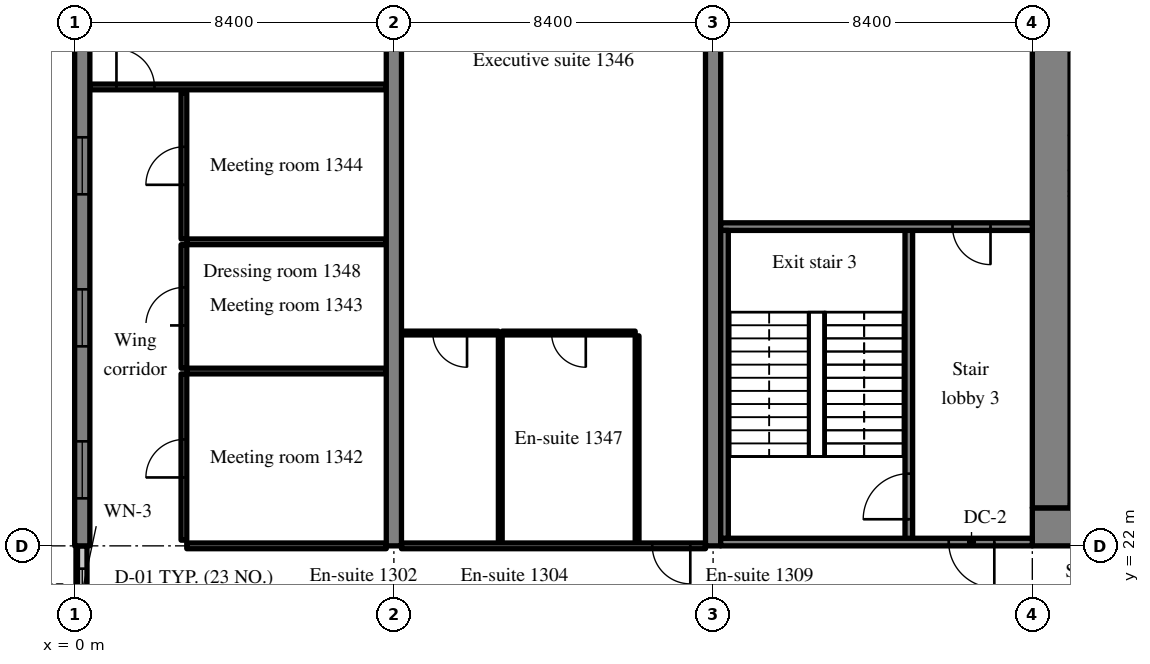
"""IFC4 building model, lengths in metres.
Left out: names, types, materials, properties, quantities, classifications, styles, units other than length and angle.
Written with IfcOpenShell. Run it as: python <this file> out.ifc"""

import sys

from ifc_helpers import new_model, si_unit, direction, frame, frame_2d, origin, place, context, subcontext, project, spatial, rectangle, extrude, source, transform, mapped, element, fill, save


model = new_model("IFC4")
c1 = context("Model", 3, precision=1e-05, world=origin(), true_north=direction((0.0, 1.0)))
c2 = subcontext(c1, "Body", "Model", "MODEL_VIEW")
j1 = project(units=[si_unit("LENGTHUNIT", "METRE"), si_unit("PLANEANGLEUNIT", "RADIAN")], contexts=[c1])
p1 = place(None, origin())
s1 = spatial("IfcSite", under=j1, at=p1, CompositionType="ELEMENT")
p2 = place(p1, origin())
s2 = spatial("IfcBuilding", under=s1, at=p2, CompositionType="ELEMENT")
p3 = place(p2, frame((0.0, 0.0, 58.2)))
s3 = spatial("IfcBuildingStorey", under=s2, at=p3, CompositionType="ELEMENT", Elevation=58.2)
m1 = source(origin(), c2, "Body", "SweptSolid", [
    extrude(rectangle(XDim=50.4, YDim=1.0, at=frame_2d((25.2, 0.0))), origin(), (0.0, 0.0, 1.0), 3.52),
])
p4 = place(p3, frame((25.2, 22.5, 0.0), z_axis=(0.0, 0.0, 1.0), x_axis=(1.0, 0.0, 0.0)))
e1 = element("IfcWall", 1, at=p4, inside=s3, PredefinedType="SHEAR", context=c2, shape_type="MappedRepresentation", body=[
    mapped(m1, transform((0.0, 0.0, 0.0), scale=1.0)),
])
m2 = source(origin(), c2, "Body", "SweptSolid", [
    extrude(rectangle(XDim=1.8, YDim=2.1, at=frame_2d((0.9, 1.05))), frame((0.0, 0.51, 0.0), z_axis=(0.0, -1.0, 0.0), x_axis=(1.0, 0.0, 0.0)), (0.0, 0.0, 1.0), 1.02),
])
p5 = place(p4, frame((15.9, 0.0, 0.0)))
e2 = element("IfcOpeningElement", 2, at=p5, cuts=e1, PredefinedType="OPENING", context=c2, shape_type="MappedRepresentation", body=[
    mapped(m2, transform((0.0, 0.0, 0.0), scale=1.0)),
])
m3 = source(origin(), c2, "Body", "SweptSolid", [
    extrude(rectangle(XDim=1.2, YDim=2.1, at=frame_2d((0.6, 1.05))), frame((0.0, 0.51, 0.0), z_axis=(0.0, -1.0, 0.0), x_axis=(1.0, 0.0, 0.0)), (0.0, 0.0, 1.0), 1.02),
])
p6 = place(p4, frame((26.987, 0.0, 0.0)))
e3 = element("IfcOpeningElement", 3, at=p6, cuts=e1, PredefinedType="OPENING", context=c2, shape_type="MappedRepresentation", body=[
    mapped(m3, transform((0.0, 0.0, 0.0), scale=1.0)),
])
m4 = source(origin(), c2, "Body", "SweptSolid", [
    extrude(rectangle(XDim=0.9, YDim=2.1, at=frame_2d((0.45, 1.05))), frame((0.0, 0.51, 0.0), z_axis=(0.0, -1.0, 0.0), x_axis=(1.0, 0.0, 0.0)), (0.0, 0.0, 1.0), 1.02),
])
p7 = place(p4, frame((34.5, 0.0, 0.0)))
e4 = element("IfcOpeningElement", 4, at=p7, cuts=e1, PredefinedType="OPENING", context=c2, shape_type="MappedRepresentation", body=[
    mapped(m4, transform((0.0, 0.0, 0.0), scale=1.0)),
])
p8 = place(p4, frame((31.5, 0.0, 0.0)))
e5 = element("IfcOpeningElement", 5, at=p8, cuts=e1, PredefinedType="OPENING", context=c2, shape_type="MappedRepresentation", body=[
    mapped(m4, transform((0.0, 0.0, 0.0), scale=1.0)),
])
p9 = place(p4, frame((39.769, 0.0, 0.0)))
e6 = element("IfcOpeningElement", 6, at=p9, cuts=e1, PredefinedType="OPENING", context=c2, shape_type="MappedRepresentation", body=[
    mapped(m4, transform((0.0, 0.0, 0.0), scale=1.0)),
])
p10 = place(p4, frame((36.756, 0.0, 0.0)))
e7 = element("IfcOpeningElement", 7, at=p10, cuts=e1, PredefinedType="OPENING", context=c2, shape_type="MappedRepresentation", body=[
    mapped(m4, transform((0.0, 0.0, 0.0), scale=1.0)),
])
p11 = place(p4, frame((6.438, 0.0, 0.0)))
e8 = element("IfcOpeningElement", 8, at=p11, cuts=e1, PredefinedType="OPENING", context=c2, shape_type="MappedRepresentation", body=[
    mapped(m3, transform((0.0, 0.0, 0.0), scale=1.0)),
])
p12 = place(p4, frame((47.725, 0.0, 0.0)))
e9 = element("IfcOpeningElement", 9, at=p12, cuts=e1, PredefinedType="OPENING", context=c2, shape_type="MappedRepresentation", body=[
    mapped(m3, transform((0.0, 0.0, 0.0), scale=1.0)),
])
m5 = source(origin(), c2, "Body", "SweptSolid", [
    extrude(rectangle(XDim=18.0, YDim=1.0, at=frame_2d((9.0, 0.0))), origin(), (0.0, 0.0, 1.0), 3.52),
])
p13 = place(p3, frame((25.7, 23.0, 0.0), z_axis=(0.0, 0.0, 1.0), x_axis=(0.0, 1.0, 0.0)))
e10 = element("IfcWall", 10, at=p13, inside=s3, PredefinedType="SHEAR", context=c2, shape_type="MappedRepresentation", body=[
    mapped(m5, transform((0.0, 0.0, 0.0), scale=1.0)),
])
m6 = source(origin(), c2, "Body", "SweptSolid", [
    extrude(rectangle(XDim=16.0, YDim=0.4, at=frame_2d((8.0, 0.0))), origin(), (0.0, 0.0, 1.0), 3.52),
])
p14 = place(p3, frame((0.2, 22.0, 0.0), z_axis=(0.0, 0.0, 1.0), x_axis=(0.0, 1.0, 0.0)))
e11 = element("IfcWall", 11, at=p14, inside=s3, PredefinedType="SHEAR", context=c2, shape_type="MappedRepresentation", body=[
    mapped(m6, transform((0.0, 0.0, 0.0), scale=1.0)),
])
m7 = source(origin(), c2, "Body", "SweptSolid", [
    extrude(rectangle(XDim=1.5, YDim=1.5, at=frame_2d((0.75, 0.75))), frame((0.0, 0.21, 0.0), z_axis=(0.0, -1.0, 0.0), x_axis=(1.0, 0.0, 0.0)), (0.0, 0.0, 1.0), 0.42),
])
p15 = place(p14, frame((1.25, 0.0, 0.9)))
e12 = element("IfcOpeningElement", 12, at=p15, cuts=e11, PredefinedType="OPENING", context=c2, shape_type="MappedRepresentation", body=[
    mapped(m7, transform((0.0, 0.0, 0.0), scale=1.0)),
])
p16 = place(p14, frame((5.25, 0.0, 0.9)))
e13 = element("IfcOpeningElement", 13, at=p16, cuts=e11, PredefinedType="OPENING", context=c2, shape_type="MappedRepresentation", body=[
    mapped(m7, transform((0.0, 0.0, 0.0), scale=1.0)),
])
p17 = place(p14, frame((9.25, 0.0, 0.9)))
e14 = element("IfcOpeningElement", 14, at=p17, cuts=e11, PredefinedType="OPENING", context=c2, shape_type="MappedRepresentation", body=[
    mapped(m7, transform((0.0, 0.0, 0.0), scale=1.0)),
])
p18 = place(p14, frame((13.25, 0.0, 0.9)))
e15 = element("IfcOpeningElement", 15, at=p18, cuts=e11, PredefinedType="OPENING", context=c2, shape_type="MappedRepresentation", body=[
    mapped(m7, transform((0.0, 0.0, 0.0), scale=1.0)),
])
m8 = source(origin(), c2, "Body", "SweptSolid", [
    extrude(rectangle(XDim=20.0, YDim=0.4, at=frame_2d((10.0, 0.0))), origin(), (0.0, 0.0, 1.0), 3.52),
])
for number, where, z_axis, x_axis in (
    (16, (8.4, 22.0, 0.0), (0.0, 0.0, 1.0), (0.0, 1.0, 0.0)),
    (17, (16.8, 22.0, 0.0), (0.0, 0.0, 1.0), (0.0, 1.0, 0.0)),
):
    element("IfcWall", number, at=place(p3, frame(where, z_axis=z_axis, x_axis=x_axis)), inside=s3, PredefinedType="SHEAR", context=c2, shape_type="MappedRepresentation", body=[
        mapped(m8, transform((0.0, 0.0, 0.0), scale=1.0)),
    ])
m9 = source(origin(), c2, "Body", "SweptSolid", [
    extrude(rectangle(XDim=2.4, YDim=0.25, at=frame_2d((1.2, 0.0))), origin(), (0.0, 0.0, 1.0), 2.62),
])
p19 = place(p3, frame((0.2, 19.6, 0.0), z_axis=(0.0, 0.0, 1.0), x_axis=(0.0, 1.0, 0.0)))
e18 = element("IfcWall", 18, at=p19, inside=s3, PredefinedType="SOLIDWALL", context=c2, shape_type="MappedRepresentation", body=[
    mapped(m9, transform((0.0, 0.0, 0.0), scale=1.0)),
])
m10 = source(origin(), c2, "Body", "SweptSolid", [
    extrude(rectangle(XDim=1.2, YDim=1.5, at=frame_2d((0.6, 0.75))), frame((0.0, 0.135, 0.0), z_axis=(0.0, -1.0, 0.0), x_axis=(1.0, 0.0, 0.0)), (0.0, 0.0, 1.0), 0.27),
])
p20 = place(p19, frame((0.6, 0.0, 0.9)))
e19 = element("IfcOpeningElement", 19, at=p20, cuts=e18, PredefinedType="OPENING", context=c2, shape_type="MappedRepresentation", body=[
    mapped(m10, transform((0.0, 0.0, 0.0), scale=1.0)),
])
m11 = source(origin(), c2, "Body", "SweptSolid", [
    extrude(rectangle(XDim=8.3, YDim=0.2, at=frame_2d((4.15, 0.0))), origin(), (0.0, 0.0, 1.0), 3.52),
])
p21 = place(p3, frame((21.95, 22.1, 0.0), z_axis=(0.0, 0.0, 1.0), x_axis=(0.0, 1.0, 0.0)))
e20 = element("IfcWall", 20, at=p21, inside=s3, PredefinedType="SOLIDWALL", context=c2, shape_type="MappedRepresentation", body=[
    mapped(m11, transform((0.0, 0.0, 0.0), scale=1.0)),
])
m12 = source(origin(), c2, "Body", "SweptSolid", [
    extrude(rectangle(XDim=1.2, YDim=2.1, at=frame_2d((0.6, 1.05))), frame((0.0, 0.11, 0.0), z_axis=(0.0, -1.0, 0.0), x_axis=(1.0, 0.0, 0.0)), (0.0, 0.0, 1.0), 0.22),
])
p22 = place(p21, frame((0.6, 0.0, 0.0)))
e21 = element("IfcOpeningElement", 21, at=p22, cuts=e20, PredefinedType="OPENING", context=c2, shape_type="MappedRepresentation", body=[
    mapped(m12, transform((0.0, 0.0, 0.0), scale=1.0)),
])
m13 = source(origin(), c2, "Body", "SweptSolid", [
    extrude(rectangle(XDim=8.2, YDim=0.2, at=frame_2d((4.1, 0.0))), origin(), (0.0, 0.0, 1.0), 3.52),
])
p23 = place(p3, frame((17.0, 22.1, 0.0), z_axis=(0.0, 0.0, 1.0), x_axis=(1.0, 0.0, 0.0)))
e22 = element("IfcWall", 22, at=p23, inside=s3, PredefinedType="SOLIDWALL", context=c2, shape_type="MappedRepresentation", body=[
    mapped(m13, transform((0.0, 0.0, 0.0), scale=1.0)),
])
p24 = place(p23, frame((6.0, 0.0, 0.0)))
e23 = element("IfcOpeningElement", 23, at=p24, cuts=e22, PredefinedType="OPENING", context=c2, shape_type="MappedRepresentation", body=[
    mapped(m12, transform((0.0, 0.0, 0.0), scale=1.0)),
])
p25 = place(p3, frame((17.0, 30.4, 0.0), z_axis=(0.0, 0.0, 1.0), x_axis=(1.0, 0.0, 0.0)))
e24 = element("IfcWall", 24, at=p25, inside=s3, PredefinedType="SOLIDWALL", context=c2, shape_type="MappedRepresentation", body=[
    mapped(m13, transform((0.0, 0.0, 0.0), scale=1.0)),
])
m14 = source(origin(), c2, "Body", "SweptSolid", [
    extrude(rectangle(XDim=1.0, YDim=2.1, at=frame_2d((0.5, 1.05))), frame((0.0, 0.11, 0.0), z_axis=(0.0, -1.0, 0.0), x_axis=(1.0, 0.0, 0.0)), (0.0, 0.0, 1.0), 0.22),
])
p26 = place(p25, frame((6.1, 0.0, 0.0)))
e25 = element("IfcOpeningElement", 25, at=p26, cuts=e24, PredefinedType="OPENING", context=c2, shape_type="MappedRepresentation", body=[
    mapped(m14, transform((0.0, 0.0, 0.0), scale=1.0)),
])
m15 = source(origin(), c2, "Body", "SweptSolid", [
    extrude(rectangle(XDim=8.1, YDim=0.2, at=frame_2d((4.05, 0.0))), origin(), (0.0, 0.0, 1.0), 3.52),
])
p27 = place(p3, frame((17.1, 22.2, 0.0), z_axis=(0.0, 0.0, 1.0), x_axis=(0.0, 1.0, 0.0)))
e26 = element("IfcWall", 26, at=p27, inside=s3, PredefinedType="SOLIDWALL", context=c2, shape_type="MappedRepresentation", body=[
    mapped(m15, transform((0.0, 0.0, 0.0), scale=1.0)),
])
m16 = source(origin(), c2, "Body", "SweptSolid", [
    extrude(rectangle(XDim=5.25, YDim=0.15, at=frame_2d((2.625, 0.0))), origin(), (0.0, 0.0, 1.0), 2.82),
])
p28 = place(p3, frame((2.95, 22.0, 0.0), z_axis=(0.0, 0.0, 1.0), x_axis=(1.0, 0.0, 0.0)))
e27 = element("IfcWall", 27, at=p28, inside=s3, PredefinedType="PARTITIONING", context=c2, shape_type="MappedRepresentation", body=[
    mapped(m16, transform((0.0, 0.0, 0.0), scale=1.0)),
])
m17 = source(origin(), c2, "Body", "SweptSolid", [
    extrude(rectangle(XDim=4.375, YDim=0.15, at=frame_2d((2.188, 0.0))), origin(), (0.0, 0.0, 1.0), 3.52),
])
p29 = place(p3, frame((2.875, 22.15, 0.0), z_axis=(0.0, 0.0, 1.0), x_axis=(0.0, 1.0, 0.0)))
e28 = element("IfcWall", 28, at=p29, inside=s3, PredefinedType="PARTITIONING", context=c2, shape_type="MappedRepresentation", body=[
    mapped(m17, transform((0.0, 0.0, 0.0), scale=1.0)),
])
m18 = source(origin(), c2, "Body", "SweptSolid", [
    extrude(rectangle(XDim=1.0, YDim=2.1, at=frame_2d((0.5, 1.05))), frame((0.0, 0.085, 0.0), z_axis=(0.0, -1.0, 0.0), x_axis=(1.0, 0.0, 0.0)), (0.0, 0.0, 1.0), 0.17),
])
p30 = place(p29, frame((1.65, 0.0, 0.0)))
e29 = element("IfcOpeningElement", 29, at=p30, cuts=e28, PredefinedType="OPENING", context=c2, shape_type="MappedRepresentation", body=[
    mapped(m18, transform((0.0, 0.0, 0.0), scale=1.0)),
])
m19 = source(origin(), c2, "Body", "SweptSolid", [
    extrude(rectangle(XDim=5.25, YDim=0.15, at=frame_2d((2.625, 0.0))), origin(), (0.0, 0.0, 1.0), 3.52),
])
p31 = place(p3, frame((2.95, 26.6, 0.0), z_axis=(0.0, 0.0, 1.0), x_axis=(1.0, 0.0, 0.0)))
e30 = element("IfcWall", 30, at=p31, inside=s3, PredefinedType="PARTITIONING", context=c2, shape_type="MappedRepresentation", body=[
    mapped(m19, transform((0.0, 0.0, 0.0), scale=1.0)),
])
m20 = source(origin(), c2, "Body", "SweptSolid", [
    extrude(rectangle(XDim=3.25, YDim=0.15, at=frame_2d((1.625, 0.0))), origin(), (0.0, 0.0, 1.0), 3.52),
])
p32 = place(p3, frame((2.875, 26.675, 0.0), z_axis=(0.0, 0.0, 1.0), x_axis=(0.0, 1.0, 0.0)))
e31 = element("IfcWall", 31, at=p32, inside=s3, PredefinedType="PARTITIONING", context=c2, shape_type="MappedRepresentation", body=[
    mapped(m20, transform((0.0, 0.0, 0.0), scale=1.0)),
])
p33 = place(p32, frame((1.125, 0.0, 0.0)))
e32 = element("IfcOpeningElement", 32, at=p33, cuts=e31, PredefinedType="OPENING", context=c2, shape_type="MappedRepresentation", body=[
    mapped(m18, transform((0.0, 0.0, 0.0), scale=1.0)),
])
p34 = place(p3, frame((2.95, 30.0, 0.0), z_axis=(0.0, 0.0, 1.0), x_axis=(1.0, 0.0, 0.0)))
e33 = element("IfcWall", 33, at=p34, inside=s3, PredefinedType="PARTITIONING", context=c2, shape_type="MappedRepresentation", body=[
    mapped(m19, transform((0.0, 0.0, 0.0), scale=1.0)),
])
m21 = source(origin(), c2, "Body", "SweptSolid", [
    extrude(rectangle(XDim=3.85, YDim=0.15, at=frame_2d((1.925, 0.0))), origin(), (0.0, 0.0, 1.0), 3.52),
])
p35 = place(p3, frame((2.875, 30.075, 0.0), z_axis=(0.0, 0.0, 1.0), x_axis=(0.0, 1.0, 0.0)))
e34 = element("IfcWall", 34, at=p35, inside=s3, PredefinedType="PARTITIONING", context=c2, shape_type="MappedRepresentation", body=[
    mapped(m21, transform((0.0, 0.0, 0.0), scale=1.0)),
])
p36 = place(p35, frame((1.425, 0.0, 0.0)))
e35 = element("IfcOpeningElement", 35, at=p36, cuts=e34, PredefinedType="OPENING", context=c2, shape_type="MappedRepresentation", body=[
    mapped(m18, transform((0.0, 0.0, 0.0), scale=1.0)),
])
m22 = source(origin(), c2, "Body", "SweptSolid", [
    extrude(rectangle(XDim=7.8, YDim=0.15, at=frame_2d((3.9, 0.0))), origin(), (0.0, 0.0, 1.0), 3.52),
])
p37 = place(p3, frame((0.4, 34.075, 0.0), z_axis=(0.0, 0.0, 1.0), x_axis=(1.0, 0.0, 0.0)))
e36 = element("IfcWall", 36, at=p37, inside=s3, PredefinedType="PARTITIONING", context=c2, shape_type="MappedRepresentation", body=[
    mapped(m22, transform((0.0, 0.0, 0.0), scale=1.0)),
])
p38 = place(p37, frame((0.7, 0.0, 0.0)))
e37 = element("IfcOpeningElement", 37, at=p38, cuts=e36, PredefinedType="OPENING", context=c2, shape_type="MappedRepresentation", body=[
    mapped(m18, transform((0.0, 0.0, 0.0), scale=1.0)),
])
m23 = source(origin(), c2, "Body", "SweptSolid", [
    extrude(rectangle(XDim=5.45, YDim=0.1, at=frame_2d((2.725, 0.0))), origin(), (0.0, 0.0, 1.0), 3.52),
])
for number, where, z_axis, x_axis in (
    (38, (14.8, 22.075, 0.0), (0.0, 0.0, 1.0), (0.0, 1.0, 0.0)),
    (39, (11.2, 22.075, 0.0), (0.0, 0.0, 1.0), (0.0, 1.0, 0.0)),
):
    element("IfcWall", number, at=place(p3, frame(where, z_axis=z_axis, x_axis=x_axis)), inside=s3, PredefinedType="PARTITIONING", context=c2, shape_type="MappedRepresentation", body=[
        mapped(m23, transform((0.0, 0.0, 0.0), scale=1.0)),
    ])
m24 = source(origin(), c2, "Body", "SweptSolid", [
    extrude(rectangle(XDim=3.5, YDim=0.1, at=frame_2d((1.75, 0.0))), origin(), (0.0, 0.0, 1.0), 3.52),
])
p39 = place(p3, frame((11.25, 27.6, 0.0), z_axis=(0.0, 0.0, 1.0), x_axis=(1.0, 0.0, 0.0)))
e40 = element("IfcWall", 40, at=p39, inside=s3, PredefinedType="PARTITIONING", context=c2, shape_type="MappedRepresentation", body=[
    mapped(m24, transform((0.0, 0.0, 0.0), scale=1.0)),
])
m25 = source(origin(), c2, "Body", "SweptSolid", [
    extrude(rectangle(XDim=0.9, YDim=2.1, at=frame_2d((0.45, 1.05))), frame((0.0, 0.06, 0.0), z_axis=(0.0, -1.0, 0.0), x_axis=(1.0, 0.0, 0.0)), (0.0, 0.0, 1.0), 0.12),
])
p40 = place(p39, frame((1.3, 0.0, 0.0)))
e41 = element("IfcOpeningElement", 41, at=p40, cuts=e40, PredefinedType="OPENING", context=c2, shape_type="MappedRepresentation", body=[
    mapped(m25, transform((0.0, 0.0, 0.0), scale=1.0)),
])
m26 = source(origin(), c2, "Body", "SweptSolid", [
    extrude(rectangle(XDim=2.55, YDim=0.1, at=frame_2d((1.275, 0.0))), origin(), (0.0, 0.0, 1.0), 3.52),
])
p41 = place(p3, frame((8.6, 27.6, 0.0), z_axis=(0.0, 0.0, 1.0), x_axis=(1.0, 0.0, 0.0)))
e42 = element("IfcWall", 42, at=p41, inside=s3, PredefinedType="PARTITIONING", context=c2, shape_type="MappedRepresentation", body=[
    mapped(m26, transform((0.0, 0.0, 0.0), scale=1.0)),
])
p42 = place(p41, frame((0.825, 0.0, 0.0)))
e43 = element("IfcOpeningElement", 43, at=p42, cuts=e42, PredefinedType="OPENING", context=c2, shape_type="MappedRepresentation", body=[
    mapped(m25, transform((0.0, 0.0, 0.0), scale=1.0)),
])
m27 = source(origin(), c2, "Body", "SweptSolid", [
    extrude(rectangle(XDim=8.0, YDim=0.15, at=frame_2d((4.0, 0.0))), origin(), (0.0, 0.0, 1.0), 2.82),
])
p43 = place(p3, frame((8.6, 22.0, 0.0), z_axis=(0.0, 0.0, 1.0), x_axis=(1.0, 0.0, 0.0)))
e44 = element("IfcWall", 44, at=p43, inside=s3, PredefinedType="PARTITIONING", context=c2, shape_type="MappedRepresentation", body=[
    mapped(m27, transform((0.0, 0.0, 0.0), scale=1.0)),
])
p44 = place(p43, frame((6.6, 0.0, 0.0)))
e45 = element("IfcOpeningElement", 45, at=p44, cuts=e44, PredefinedType="OPENING", context=c2, shape_type="MappedRepresentation", body=[
    mapped(m18, transform((0.0, 0.0, 0.0), scale=1.0)),
])
m28 = source(origin(), c2, "Body", "SweptSolid", [
    extrude(rectangle(XDim=1.5, YDim=1.5, at=frame_2d((0.75, 0.75))), frame((0.0, 0.03, 0.0), z_axis=(0.0, -1.0, 0.0), x_axis=(1.0, 0.0, 0.0)), (0.0, 0.0, 1.0), 0.06),
])
p45 = place(p15, origin())
e46 = element("IfcWindow", 46, at=p45, inside=s3, PartitioningType="SINGLE_PANEL", PredefinedType="WINDOW", context=c2, shape_type="MappedRepresentation", body=[
    mapped(m28, transform((0.0, 0.0, 0.0), scale=1.0)),
])
fill(e12, e46)
p46 = place(p16, origin())
e47 = element("IfcWindow", 47, at=p46, inside=s3, PartitioningType="SINGLE_PANEL", PredefinedType="WINDOW", context=c2, shape_type="MappedRepresentation", body=[
    mapped(m28, transform((0.0, 0.0, 0.0), scale=1.0)),
])
fill(e13, e47)
p47 = place(p17, origin())
e48 = element("IfcWindow", 48, at=p47, inside=s3, PartitioningType="SINGLE_PANEL", PredefinedType="WINDOW", context=c2, shape_type="MappedRepresentation", body=[
    mapped(m28, transform((0.0, 0.0, 0.0), scale=1.0)),
])
fill(e14, e48)
m29 = source(origin(), c2, "Body", "SweptSolid", [
    extrude(rectangle(XDim=1.2, YDim=1.5, at=frame_2d((0.6, 0.75))), frame((0.0, 0.03, 0.0), z_axis=(0.0, -1.0, 0.0), x_axis=(1.0, 0.0, 0.0)), (0.0, 0.0, 1.0), 0.06),
])
p48 = place(p20, origin())
e49 = element("IfcWindow", 49, at=p48, inside=s3, PartitioningType="SINGLE_PANEL", PredefinedType="WINDOW", context=c2, shape_type="MappedRepresentation", body=[
    mapped(m29, transform((0.0, 0.0, 0.0), scale=1.0)),
])
fill(e19, e49)
m30 = source(origin(), c2, "Body", "SweptSolid", [
    extrude(rectangle(XDim=1.2, YDim=2.1, at=frame_2d((0.6, 1.05))), frame((0.0, 0.025, 0.0), z_axis=(0.0, -1.0, 0.0), x_axis=(1.0, 0.0, 0.0)), (0.0, 0.0, 1.0), 0.05),
])
p49 = place(p22, origin())
e50 = element("IfcDoor", 50, at=p49, inside=s3, OperationType="SINGLE_SWING_LEFT", PredefinedType="DOOR", context=c2, shape_type="MappedRepresentation", body=[
    mapped(m30, transform((0.0, 0.0, 0.0), scale=1.0)),
])
fill(e21, e50)
p50 = place(p24, origin())
e51 = element("IfcDoor", 51, at=p50, inside=s3, OperationType="SINGLE_SWING_RIGHT", PredefinedType="DOOR", context=c2, shape_type="MappedRepresentation", body=[
    mapped(m30, transform((0.0, 0.0, 0.0), scale=1.0)),
])
fill(e23, e51)
m31 = source(origin(), c2, "Body", "SweptSolid", [
    extrude(rectangle(XDim=1.0, YDim=2.1, at=frame_2d((0.5, 1.05))), frame((0.0, 0.025, 0.0), z_axis=(0.0, -1.0, 0.0), x_axis=(1.0, 0.0, 0.0)), (0.0, 0.0, 1.0), 0.05),
])
p51 = place(p26, origin())
e52 = element("IfcDoor", 52, at=p51, inside=s3, OperationType="SINGLE_SWING_RIGHT", PredefinedType="DOOR", context=c2, shape_type="MappedRepresentation", body=[
    mapped(m31, transform((0.0, 0.0, 0.0), scale=1.0)),
])
fill(e25, e52)
p52 = place(p30, origin())
e53 = element("IfcDoor", 53, at=p52, inside=s3, OperationType="SINGLE_SWING_LEFT", PredefinedType="DOOR", context=c2, shape_type="MappedRepresentation", body=[
    mapped(m31, transform((0.0, 0.0, 0.0), scale=1.0)),
])
fill(e29, e53)
p53 = place(p33, origin())
e54 = element("IfcDoor", 54, at=p53, inside=s3, OperationType="SINGLE_SWING_LEFT", PredefinedType="DOOR", context=c2, shape_type="MappedRepresentation", body=[
    mapped(m31, transform((0.0, 0.0, 0.0), scale=1.0)),
])
fill(e32, e54)
p54 = place(p36, origin())
e55 = element("IfcDoor", 55, at=p54, inside=s3, OperationType="SINGLE_SWING_LEFT", PredefinedType="DOOR", context=c2, shape_type="MappedRepresentation", body=[
    mapped(m31, transform((0.0, 0.0, 0.0), scale=1.0)),
])
fill(e35, e55)
p55 = place(p38, origin())
e56 = element("IfcDoor", 56, at=p55, inside=s3, OperationType="SINGLE_SWING_LEFT", PredefinedType="DOOR", context=c2, shape_type="MappedRepresentation", body=[
    mapped(m31, transform((0.0, 0.0, 0.0), scale=1.0)),
])
fill(e37, e56)
m32 = source(origin(), c2, "Body", "SweptSolid", [
    extrude(rectangle(XDim=0.9, YDim=2.1, at=frame_2d((0.45, 1.05))), frame((0.0, 0.025, 0.0), z_axis=(0.0, -1.0, 0.0), x_axis=(1.0, 0.0, 0.0)), (0.0, 0.0, 1.0), 0.05),
])
p56 = place(p40, origin())
e57 = element("IfcDoor", 57, at=p56, inside=s3, OperationType="SINGLE_SWING_RIGHT", PredefinedType="DOOR", context=c2, shape_type="MappedRepresentation", body=[
    mapped(m32, transform((0.0, 0.0, 0.0), scale=1.0)),
])
fill(e41, e57)
p57 = place(p42, origin())
e58 = element("IfcDoor", 58, at=p57, inside=s3, OperationType="SINGLE_SWING_RIGHT", PredefinedType="DOOR", context=c2, shape_type="MappedRepresentation", body=[
    mapped(m32, transform((0.0, 0.0, 0.0), scale=1.0)),
])
fill(e43, e58)
p58 = place(p44, origin())
e59 = element("IfcDoor", 59, at=p58, inside=s3, OperationType="SINGLE_SWING_RIGHT", PredefinedType="DOOR", context=c2, shape_type="MappedRepresentation", body=[
    mapped(m31, transform((0.0, 0.0, 0.0), scale=1.0)),
])
fill(e45, e59)
save(model, sys.argv[1])
